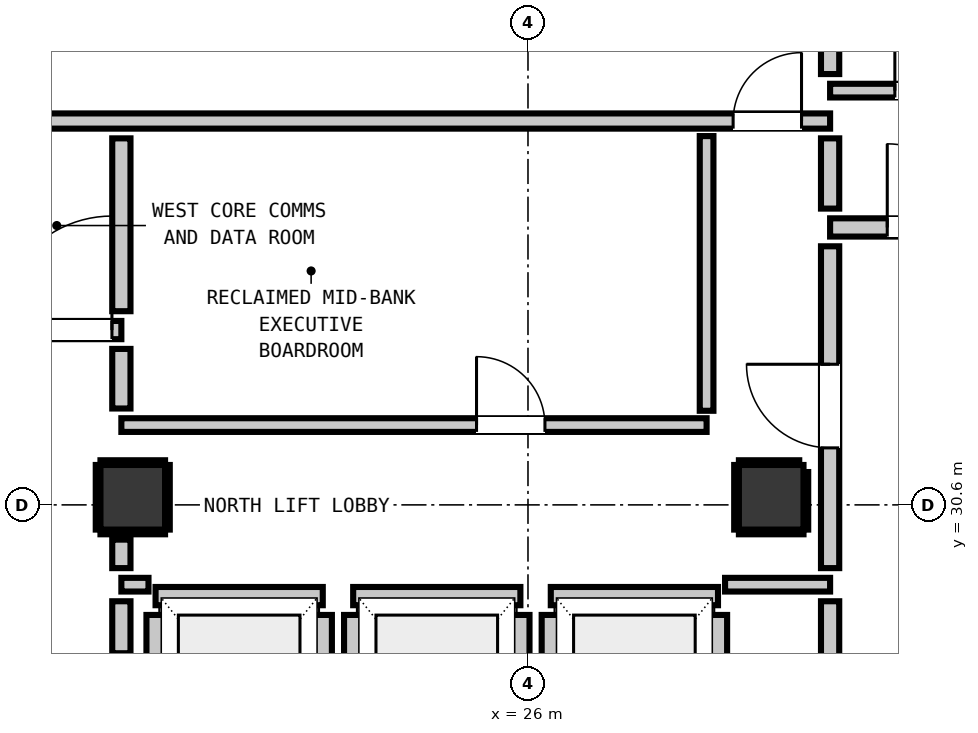
"""IFC4 building model, lengths in metres.
Left out: names, types, materials, properties, quantities, classifications, styles, units other than length and angle.
Written with IfcOpenShell. Run it as: python <this file> out.ifc"""

import sys

from ifc_helpers import new_model, si_unit, direction, frame, frame_2d, origin, origin_2d, place, context, subcontext, project, spatial, rectangle, extrude, element, fill, save


model = new_model("IFC4")
c1 = context("Model", 3, precision=1e-05, world=origin(), true_north=direction((0.0, 1.0)))
c2 = subcontext(c1, "Body", "Model", "MODEL_VIEW")
j1 = project(units=[si_unit("LENGTHUNIT", "METRE"), si_unit("PLANEANGLEUNIT", "RADIAN")], contexts=[c1])
p1 = place(None, origin())
s1 = spatial("IfcSite", under=j1, at=p1, CompositionType="ELEMENT")
p2 = place(p1, origin())
s2 = spatial("IfcBuilding", under=s1, at=p2, CompositionType="ELEMENT")
p3 = place(p2, frame((0.0, 0.0, 244.56)))
s3 = spatial("IfcBuildingStorey", under=s2, at=p3, CompositionType="ELEMENT", Elevation=244.56)
for number, where, z_axis, x_axis in (
    (1, (20.8, 30.7, 0.0), (0.0, 0.0, 1.0), (1.0, 0.0, 0.0)),
    (2, (29.2, 30.7, 0.0), (0.0, 0.0, 1.0), (1.0, 0.0, 0.0)),
):
    element("IfcColumn", number, at=place(p3, frame(where, z_axis=z_axis, x_axis=x_axis)), inside=s3, PredefinedType="COLUMN", context=c2, shape_type="SweptSolid", body=[
        extrude(rectangle(XDim=0.85, YDim=0.85, at=origin_2d()), origin(), (0.0, 0.0, 1.0), 3.32),
    ])
p4 = place(p3, frame((21.1, 29.4, 0.0), z_axis=(0.0, 0.0, 1.0), x_axis=(1.0, 0.0, 0.0)))
e3 = element("IfcWall", 3, at=p4, inside=s3, PredefinedType="PARTITIONING", context=c2, shape_type="SweptSolid", body=[
    extrude(rectangle(XDim=2.2, YDim=0.24, at=frame_2d((1.1, 0.0))), origin(), (0.0, 0.0, 1.0), 3.1),
])
p5 = place(p3, frame((21.1, 27.048, 0.0), z_axis=(0.0, 0.0, 1.0), x_axis=(0.0, 1.0, 0.0)))
e4 = element("IfcWall", 4, at=p5, inside=s3, PredefinedType="PARTITIONING", context=c2, shape_type="SweptSolid", body=[
    extrude(rectangle(XDim=2.104, YDim=0.24, at=frame_2d((1.052, 0.0))), origin(), (0.0, 0.0, 1.0), 2.335),
])
p6 = place(p3, frame((23.3, 27.048, 0.0), z_axis=(0.0, 0.0, 1.0), x_axis=(0.0, 1.0, 0.0)))
e5 = element("IfcWall", 5, at=p6, inside=s3, PredefinedType="PARTITIONING", context=c2, shape_type="SweptSolid", body=[
    extrude(rectangle(XDim=2.104, YDim=0.24, at=frame_2d((1.052, 0.0))), origin(), (0.0, 0.0, 1.0), 3.1),
])
p7 = place(p3, frame((23.7, 29.4, 0.0), z_axis=(0.0, 0.0, 1.0), x_axis=(1.0, 0.0, 0.0)))
e6 = element("IfcWall", 6, at=p7, inside=s3, PredefinedType="PARTITIONING", context=c2, shape_type="SweptSolid", body=[
    extrude(rectangle(XDim=2.2, YDim=0.24, at=frame_2d((1.1, 0.0))), origin(), (0.0, 0.0, 1.0), 3.1),
])
for number, where, z_axis, x_axis in (
    (7, (23.7, 27.048, 0.0), (0.0, 0.0, 1.0), (0.0, 1.0, 0.0)),
    (8, (25.9, 27.048, 0.0), (0.0, 0.0, 1.0), (0.0, 1.0, 0.0)),
):
    element("IfcWall", number, at=place(p3, frame(where, z_axis=z_axis, x_axis=x_axis)), inside=s3, PredefinedType="PARTITIONING", context=c2, shape_type="SweptSolid", body=[
        extrude(rectangle(XDim=2.104, YDim=0.24, at=frame_2d((1.052, 0.0))), origin(), (0.0, 0.0, 1.0), 3.1),
    ])
p8 = place(p3, frame((26.3, 29.4, 0.0), z_axis=(0.0, 0.0, 1.0), x_axis=(1.0, 0.0, 0.0)))
e9 = element("IfcWall", 9, at=p8, inside=s3, PredefinedType="PARTITIONING", context=c2, shape_type="SweptSolid", body=[
    extrude(rectangle(XDim=2.2, YDim=0.24, at=frame_2d((1.1, 0.0))), origin(), (0.0, 0.0, 1.0), 3.1),
])
p9 = place(p3, frame((26.3, 27.048, 0.0), z_axis=(0.0, 0.0, 1.0), x_axis=(0.0, 1.0, 0.0)))
e10 = element("IfcWall", 10, at=p9, inside=s3, PredefinedType="PARTITIONING", context=c2, shape_type="SweptSolid", body=[
    extrude(rectangle(XDim=2.104, YDim=0.24, at=frame_2d((1.052, 0.0))), origin(), (0.0, 0.0, 1.0), 3.1),
])
p10 = place(p3, frame((28.5, 27.33, 0.0), z_axis=(0.0, 0.0, 1.0), x_axis=(0.0, 1.0, 0.0)))
e11 = element("IfcWall", 11, at=p10, inside=s3, PredefinedType="PARTITIONING", context=c2, shape_type="SweptSolid", body=[
    extrude(rectangle(XDim=1.822, YDim=0.24, at=frame_2d((0.911, 0.0))), origin(), (0.0, 0.0, 1.0), 3.1),
])
p11 = place(p3, frame((17.45, 32.9, 0.0), z_axis=(0.0, 0.0, 1.0), x_axis=(1.0, 0.0, 0.0)))
e12 = element("IfcWall", 12, at=p11, inside=s3, PredefinedType="PARTITIONING", context=c2, shape_type="SweptSolid", body=[
    extrude(rectangle(XDim=3.2, YDim=0.24, at=frame_2d((1.6, 0.0))), origin(), (0.0, 0.0, 1.0), 3.1),
])
p12 = place(p11, frame((0.159, 0.0, 0.0)))
e13 = element("IfcOpeningElement", 13, at=p12, cuts=e12, PredefinedType="OPENING", context=c2, shape_type="SweptSolid", body=[
    extrude(rectangle(XDim=1.1, YDim=2.15, at=frame_2d((0.55, 1.075))), frame((0.0, 0.13, 0.0), z_axis=(0.0, -1.0, 0.0), x_axis=(1.0, 0.0, 0.0)), (0.0, 0.0, 1.0), 0.26),
])
p13 = place(p11, frame((1.576, 0.0, 0.0)))
e14 = element("IfcOpeningElement", 14, at=p13, cuts=e12, PredefinedType="OPENING", context=c2, shape_type="SweptSolid", body=[
    extrude(rectangle(XDim=1.5, YDim=2.15, at=frame_2d((0.75, 1.075))), frame((0.0, 0.13, 0.0), z_axis=(0.0, -1.0, 0.0), x_axis=(1.0, 0.0, 0.0)), (0.0, 0.0, 1.0), 0.26),
])
p14 = place(p3, frame((29.975, 34.25, 0.0), z_axis=(0.0, 0.0, 1.0), x_axis=(1.0, 0.0, 0.0)))
e15 = element("IfcWall", 15, at=p14, inside=s3, PredefinedType="PARTITIONING", context=c2, shape_type="SweptSolid", body=[
    extrude(rectangle(XDim=2.475, YDim=0.24, at=frame_2d((1.237, 0.0))), origin(), (0.0, 0.0, 1.0), 3.1),
])
p15 = place(p14, frame((0.752, 0.0, 0.0)))
e16 = element("IfcOpeningElement", 16, at=p15, cuts=e15, PredefinedType="OPENING", context=c2, shape_type="SweptSolid", body=[
    extrude(rectangle(XDim=1.1, YDim=2.15, at=frame_2d((0.55, 1.075))), frame((0.0, 0.13, 0.0), z_axis=(0.0, -1.0, 0.0), x_axis=(1.0, 0.0, 0.0)), (0.0, 0.0, 1.0), 0.26),
])
p16 = place(p3, frame((18.95, 35.65, 0.0), z_axis=(0.0, 0.0, 1.0), x_axis=(1.0, 0.0, 0.0)))
e17 = element("IfcWall", 17, at=p16, inside=s3, PredefinedType="PARTITIONING", context=c2, shape_type="SweptSolid", body=[
    extrude(rectangle(XDim=11.025, YDim=0.2, at=frame_2d((5.513, 0.0))), origin(), (0.0, 0.0, 1.0), 3.1),
])
p17 = place(p16, frame((9.749, 0.0, 0.0)))
e18 = element("IfcOpeningElement", 18, at=p17, cuts=e17, PredefinedType="OPENING", context=c2, shape_type="SweptSolid", body=[
    extrude(rectangle(XDim=0.9, YDim=2.1, at=frame_2d((0.45, 1.05))), frame((0.0, 0.11, 0.0), z_axis=(0.0, -1.0, 0.0), x_axis=(1.0, 0.0, 0.0)), (0.0, 0.0, 1.0), 0.22),
])
p18 = place(p3, frame((20.65, 29.55, 0.0), z_axis=(0.0, 0.0, 1.0), x_axis=(1.0, 0.0, 0.0)))
e19 = element("IfcWall", 19, at=p18, inside=s3, PredefinedType="PARTITIONING", context=c2, shape_type="SweptSolid", body=[
    extrude(rectangle(XDim=0.357, YDim=0.18, at=frame_2d((0.179, 0.0))), origin(), (0.0, 0.0, 1.0), 3.1),
])
p19 = place(p3, frame((28.593, 29.55, 0.0), z_axis=(0.0, 0.0, 1.0), x_axis=(1.0, 0.0, 0.0)))
e20 = element("IfcWall", 20, at=p19, inside=s3, PredefinedType="PARTITIONING", context=c2, shape_type="SweptSolid", body=[
    extrude(rectangle(XDim=1.382, YDim=0.18, at=frame_2d((0.691, 0.0))), origin(), (0.0, 0.0, 1.0), 3.1),
])
p20 = place(p3, frame((20.65, 31.65, 0.0), z_axis=(0.0, 0.0, 1.0), x_axis=(1.0, 0.0, 0.0)))
e21 = element("IfcWall", 21, at=p20, inside=s3, PredefinedType="PARTITIONING", context=c2, shape_type="SweptSolid", body=[
    extrude(rectangle(XDim=7.7, YDim=0.18, at=frame_2d((3.85, 0.0))), origin(), (0.0, 0.0, 1.0), 3.1),
])
p21 = place(p20, frame((4.673, 0.0, 0.0)))
e22 = element("IfcOpeningElement", 22, at=p21, cuts=e21, PredefinedType="OPENING", context=c2, shape_type="SweptSolid", body=[
    extrude(rectangle(XDim=0.9, YDim=2.1, at=frame_2d((0.45, 1.05))), frame((0.0, 0.1, 0.0), z_axis=(0.0, -1.0, 0.0), x_axis=(1.0, 0.0, 0.0)), (0.0, 0.0, 1.0), 0.2),
])
p22 = place(p3, frame((29.975, 36.05, 0.0), z_axis=(0.0, 0.0, 1.0), x_axis=(1.0, 0.0, 0.0)))
e23 = element("IfcWall", 23, at=p22, inside=s3, PredefinedType="PARTITIONING", context=c2, shape_type="SweptSolid", body=[
    extrude(rectangle(XDim=2.505, YDim=0.18, at=frame_2d((1.252, 0.0))), origin(), (0.0, 0.0, 1.0), 3.1),
])
p23 = place(p22, frame((0.852, 0.0, 0.0)))
e24 = element("IfcOpeningElement", 24, at=p23, cuts=e23, PredefinedType="OPENING", context=c2, shape_type="SweptSolid", body=[
    extrude(rectangle(XDim=0.9, YDim=2.1, at=frame_2d((0.45, 1.05))), frame((0.0, 0.1, 0.0), z_axis=(0.0, -1.0, 0.0), x_axis=(1.0, 0.0, 0.0)), (0.0, 0.0, 1.0), 0.2),
])
p24 = place(p3, frame((20.65, 28.648, 0.0), z_axis=(0.0, 0.0, 1.0), x_axis=(0.0, 1.0, 0.0)))
e25 = element("IfcWall", 25, at=p24, inside=s3, PredefinedType="PARTITIONING", context=c2, shape_type="SweptSolid", body=[
    extrude(rectangle(XDim=0.684, YDim=0.24, at=frame_2d((0.342, 0.0))), origin(), (0.0, 0.0, 1.0), 2.335),
])
p25 = place(p3, frame((20.65, 29.768, 0.0), z_axis=(0.0, 0.0, 1.0), x_axis=(0.0, 1.0, 0.0)))
e26 = element("IfcWall", 26, at=p25, inside=s3, PredefinedType="PARTITIONING", context=c2, shape_type="SweptSolid", body=[
    extrude(rectangle(XDim=0.375, YDim=0.24, at=frame_2d((0.188, 0.0))), origin(), (0.0, 0.0, 1.0), 2.335),
])
p26 = place(p3, frame((20.65, 31.868, 0.0), z_axis=(0.0, 0.0, 1.0), x_axis=(0.0, 1.0, 0.0)))
e27 = element("IfcWall", 27, at=p26, inside=s3, PredefinedType="PARTITIONING", context=c2, shape_type="SweptSolid", body=[
    extrude(rectangle(XDim=0.784, YDim=0.24, at=frame_2d((0.392, 0.0))), origin(), (0.0, 0.0, 1.0), 2.335),
])
p27 = place(p3, frame((20.65, 33.148, 0.0), z_axis=(0.0, 0.0, 1.0), x_axis=(0.0, 1.0, 0.0)))
e28 = element("IfcWall", 28, at=p27, inside=s3, PredefinedType="PARTITIONING", context=c2, shape_type="SweptSolid", body=[
    extrude(rectangle(XDim=2.274, YDim=0.24, at=frame_2d((1.137, 0.0))), origin(), (0.0, 0.0, 1.0), 2.335),
])
p28 = place(p3, frame((29.975, 25.648, 0.0), z_axis=(0.0, 0.0, 1.0), x_axis=(0.0, 1.0, 0.0)))
e29 = element("IfcWall", 29, at=p28, inside=s3, PredefinedType="PARTITIONING", context=c2, shape_type="SweptSolid", body=[
    extrude(rectangle(XDim=3.684, YDim=0.24, at=frame_2d((1.842, 0.0))), origin(), (0.0, 0.0, 1.0), 3.1),
])
p29 = place(p3, frame((29.975, 29.768, 0.0), z_axis=(0.0, 0.0, 1.0), x_axis=(0.0, 1.0, 0.0)))
e30 = element("IfcWall", 30, at=p29, inside=s3, PredefinedType="PARTITIONING", context=c2, shape_type="SweptSolid", body=[
    extrude(rectangle(XDim=4.234, YDim=0.24, at=frame_2d((2.117, 0.0))), origin(), (0.0, 0.0, 1.0), 3.1),
])
p30 = place(p29, frame((1.582, 0.0, 0.0)))
e31 = element("IfcOpeningElement", 31, at=p30, cuts=e30, PredefinedType="OPENING", context=c2, shape_type="SweptSolid", body=[
    extrude(rectangle(XDim=1.1, YDim=2.15, at=frame_2d((0.55, 1.075))), frame((0.0, 0.13, 0.0), z_axis=(0.0, -1.0, 0.0), x_axis=(1.0, 0.0, 0.0)), (0.0, 0.0, 1.0), 0.26),
])
p31 = place(p3, frame((29.975, 34.498, 0.0), z_axis=(0.0, 0.0, 1.0), x_axis=(0.0, 1.0, 0.0)))
e32 = element("IfcWall", 32, at=p31, inside=s3, PredefinedType="PARTITIONING", context=c2, shape_type="SweptSolid", body=[
    extrude(rectangle(XDim=0.924, YDim=0.24, at=frame_2d((0.462, 0.0))), origin(), (0.0, 0.0, 1.0), 3.1),
])
p32 = place(p3, frame((29.975, 36.268, 0.0), z_axis=(0.0, 0.0, 1.0), x_axis=(0.0, 1.0, 0.0)))
e33 = element("IfcWall", 33, at=p32, inside=s3, PredefinedType="PARTITIONING", context=c2, shape_type="SweptSolid", body=[
    extrude(rectangle(XDim=2.294, YDim=0.24, at=frame_2d((1.147, 0.0))), origin(), (0.0, 0.0, 1.0), 3.1),
])
p33 = place(p3, frame((28.35, 31.838, 0.0), z_axis=(0.0, 0.0, 1.0), x_axis=(0.0, 1.0, 0.0)))
e34 = element("IfcWall", 34, at=p33, inside=s3, PredefinedType="PARTITIONING", context=c2, shape_type="SweptSolid", body=[
    extrude(rectangle(XDim=3.614, YDim=0.18, at=frame_2d((1.807, 0.0))), origin(), (0.0, 0.0, 1.0), 3.1),
])
for number, where, z_axis, x_axis in (
    (35, (20.375, 30.243, 0.0), (0.0, 0.0, 1.0), (1.0, 0.0, 0.0)),
    (36, (20.375, 31.157, 0.0), (0.0, 0.0, 1.0), (1.0, 0.0, 0.0)),
    (37, (20.343, 30.275, 0.0), (0.0, 0.0, 1.0), (0.0, 1.0, 0.0)),
    (38, (21.257, 30.275, 0.0), (0.0, 0.0, 1.0), (0.0, 1.0, 0.0)),
    (39, (28.775, 30.243, 0.0), (0.0, 0.0, 1.0), (1.0, 0.0, 0.0)),
):
    element("IfcWall", number, at=place(p3, frame(where, z_axis=z_axis, x_axis=x_axis)), inside=s3, PredefinedType="PARTITIONING", context=c2, shape_type="SweptSolid", body=[
        extrude(rectangle(XDim=0.85, YDim=0.06, at=frame_2d((0.425, 0.0))), origin(), (0.0, 0.0, 1.0), 1.45),
    ])
p34 = place(p3, frame((28.775, 31.157, 0.0), z_axis=(0.0, 0.0, 1.0), x_axis=(1.0, 0.0, 0.0)))
e40 = element("IfcWall", 40, at=p34, inside=s3, PredefinedType="PARTITIONING", context=c2, shape_type="SweptSolid", body=[
    extrude(rectangle(XDim=0.794, YDim=0.06, at=frame_2d((0.397, 0.0))), origin(), (0.0, 0.0, 1.0), 1.45),
])
p35 = place(p3, frame((28.743, 30.275, 0.0), z_axis=(0.0, 0.0, 1.0), x_axis=(0.0, 1.0, 0.0)))
e41 = element("IfcWall", 41, at=p35, inside=s3, PredefinedType="PARTITIONING", context=c2, shape_type="SweptSolid", body=[
    extrude(rectangle(XDim=0.85, YDim=0.06, at=frame_2d((0.425, 0.0))), origin(), (0.0, 0.0, 1.0), 1.45),
])
p36 = place(p3, frame((29.657, 30.275, 0.0), z_axis=(0.0, 0.0, 1.0), x_axis=(0.0, 1.0, 0.0)))
e42 = element("IfcWall", 42, at=p36, inside=s3, PredefinedType="PARTITIONING", context=c2, shape_type="SweptSolid", body=[
    extrude(rectangle(XDim=0.757, YDim=0.06, at=frame_2d((0.378, 0.0))), origin(), (0.0, 0.0, 1.0), 1.45),
])
p37 = place(p30, origin())
e43 = element("IfcDoor", 43, at=p37, inside=s3, OperationType="SINGLE_SWING_RIGHT", PredefinedType="DOOR", context=c2, shape_type="SweptSolid", body=[
    extrude(rectangle(XDim=1.1, YDim=2.15, at=frame_2d((0.55, 1.075))), frame((0.0, 0.025, 0.0), z_axis=(0.0, -1.0, 0.0), x_axis=(1.0, 0.0, 0.0)), (0.0, 0.0, 1.0), 0.05),
])
fill(e31, e43)
p38 = place(p15, origin())
e44 = element("IfcDoor", 44, at=p38, inside=s3, OperationType="SINGLE_SWING_LEFT", PredefinedType="DOOR", context=c2, shape_type="SweptSolid", body=[
    extrude(rectangle(XDim=1.1, YDim=2.15, at=frame_2d((0.55, 1.075))), frame((0.0, 0.025, 0.0), z_axis=(0.0, -1.0, 0.0), x_axis=(1.0, 0.0, 0.0)), (0.0, 0.0, 1.0), 0.05),
])
fill(e16, e44)
p39 = place(p13, origin())
e45 = element("IfcDoor", 45, at=p39, inside=s3, OperationType="SINGLE_SWING_RIGHT", PredefinedType="DOOR", context=c2, shape_type="SweptSolid", body=[
    extrude(rectangle(XDim=1.5, YDim=2.15, at=frame_2d((0.75, 1.075))), frame((0.0, 0.025, 0.0), z_axis=(0.0, -1.0, 0.0), x_axis=(1.0, 0.0, 0.0)), (0.0, 0.0, 1.0), 0.05),
])
fill(e14, e45)
p40 = place(p23, origin())
e46 = element("IfcDoor", 46, at=p40, inside=s3, OperationType="SINGLE_SWING_LEFT", PredefinedType="DOOR", context=c2, shape_type="SweptSolid", body=[
    extrude(rectangle(XDim=0.9, YDim=2.1, at=frame_2d((0.45, 1.05))), frame((0.0, 0.025, 0.0), z_axis=(0.0, -1.0, 0.0), x_axis=(1.0, 0.0, 0.0)), (0.0, 0.0, 1.0), 0.05),
])
fill(e24, e46)
p41 = place(p17, origin())
e47 = element("IfcDoor", 47, at=p41, inside=s3, OperationType="SINGLE_SWING_RIGHT", PredefinedType="DOOR", context=c2, shape_type="SweptSolid", body=[
    extrude(rectangle(XDim=0.9, YDim=2.1, at=frame_2d((0.45, 1.05))), frame((0.0, 0.025, 0.0), z_axis=(0.0, -1.0, 0.0), x_axis=(1.0, 0.0, 0.0)), (0.0, 0.0, 1.0), 0.05),
])
fill(e18, e47)
p42 = place(p21, origin())
e48 = element("IfcDoor", 48, at=p42, inside=s3, OperationType="SINGLE_SWING_LEFT", PredefinedType="DOOR", context=c2, shape_type="SweptSolid", body=[
    extrude(rectangle(XDim=0.9, YDim=2.1, at=frame_2d((0.45, 1.05))), frame((0.0, 0.025, 0.0), z_axis=(0.0, -1.0, 0.0), x_axis=(1.0, 0.0, 0.0)), (0.0, 0.0, 1.0), 0.05),
])
fill(e22, e48)
save(model, sys.argv[1])
